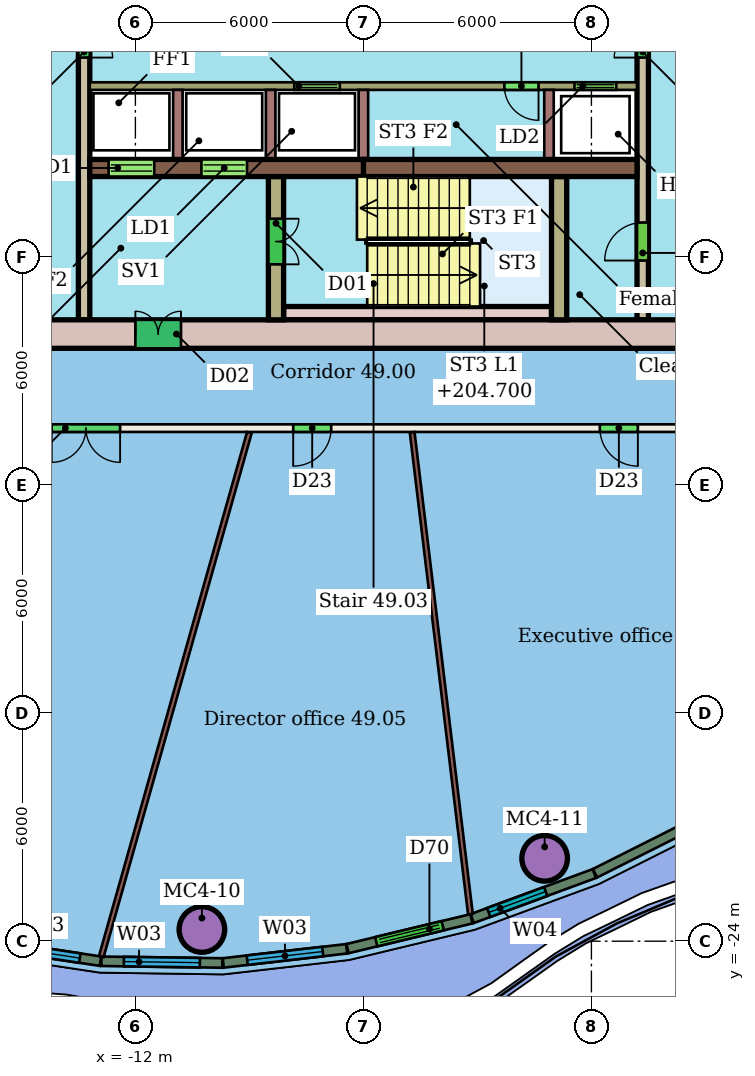
"""IFC4 building model, lengths in metres.
Left out: names, types, materials, properties, quantities, classifications, styles, units other than length and angle.
Written with IfcOpenShell. Run it as: python <this file> out.ifc"""

import sys

from ifc_helpers import new_model, si_unit, direction, frame, frame_2d, origin, origin_2d, place, context, subcontext, project, spatial, rectangle, hollow_circle, extrude, element, fill, save


model = new_model("IFC4")
c1 = context("Model", 3, precision=1e-05, world=origin(), true_north=direction((0.0, 1.0)))
c2 = subcontext(c1, "Body", "Model", "MODEL_VIEW")
j1 = project(units=[si_unit("LENGTHUNIT", "METRE"), si_unit("PLANEANGLEUNIT", "RADIAN")], contexts=[c1])
p1 = place(None, origin())
s1 = spatial("IfcSite", under=j1, at=p1, CompositionType="ELEMENT")
p2 = place(p1, origin())
s2 = spatial("IfcBuilding", under=s1, at=p2, CompositionType="ELEMENT")
p3 = place(p2, frame((0.0, 0.0, 202.9)))
s3 = spatial("IfcBuildingStorey", under=s2, at=p3, CompositionType="ELEMENT", Elevation=202.9)
for number, where, z_axis, x_axis in (
    (1, (-10.25, -23.691, 0.0), (0.0, 0.0, 1.0), (1.0, 0.0, 0.0)),
    (2, (-1.231, -21.819, 0.0), (0.0, 0.0, 1.0), (1.0, 0.0, 0.0)),
):
    element("IfcColumn", number, at=place(p3, frame(where, z_axis=z_axis, x_axis=x_axis)), inside=s3, PredefinedType="COLUMN", context=c2, shape_type="SweptSolid", body=[
        extrude(hollow_circle(Radius=0.6, WallThickness=0.045, at=origin_2d()), origin(), (0.0, 0.0, 1.0), 3.45),
    ])
p4 = place(p3, frame((9.6, -10.5, 0.0), z_axis=(0.0, 0.0, 1.0), x_axis=(-1.0, 0.0, 0.0)))
e3 = element("IfcWall", 3, at=p4, inside=s3, PredefinedType="PARTITIONING", context=c2, shape_type="SweptSolid", body=[
    extrude(rectangle(XDim=31.2, YDim=0.2, at=frame_2d((15.6, 0.0))), origin(), (0.0, 0.0, 1.0), 3.45),
])
p5 = place(p4, frame((22.002, 0.0, 0.0)))
e4 = element("IfcOpeningElement", 4, at=p5, cuts=e3, PredefinedType="OPENING", context=c2, shape_type="SweptSolid", body=[
    extrude(rectangle(XDim=1.8, YDim=2.1, at=frame_2d((0.9, 1.05))), frame((0.0, 0.11, 0.0), z_axis=(0.0, -1.0, 0.0), x_axis=(1.0, 0.0, 0.0)), (0.0, 0.0, 1.0), 0.22),
])
p6 = place(p4, frame((16.448, 0.0, 0.0)))
e5 = element("IfcOpeningElement", 5, at=p6, cuts=e3, PredefinedType="OPENING", context=c2, shape_type="SweptSolid", body=[
    extrude(rectangle(XDim=1.0, YDim=2.4, at=frame_2d((0.5, 1.2))), frame((0.0, 0.11, 0.0), z_axis=(0.0, -1.0, 0.0), x_axis=(1.0, 0.0, 0.0)), (0.0, 0.0, 1.0), 0.22),
])
p7 = place(p4, frame((8.378, 0.0, 0.0)))
e6 = element("IfcOpeningElement", 6, at=p7, cuts=e3, PredefinedType="OPENING", context=c2, shape_type="SweptSolid", body=[
    extrude(rectangle(XDim=1.0, YDim=2.4, at=frame_2d((0.5, 1.2))), frame((0.0, 0.11, 0.0), z_axis=(0.0, -1.0, 0.0), x_axis=(1.0, 0.0, 0.0)), (0.0, 0.0, 1.0), 0.22),
])
p8 = place(p3, frame((-12.897, -24.403, 0.0), z_axis=(0.0, 0.0, 1.0), x_axis=(0.271967297308, 0.962306494416, 0.0)))
e7 = element("IfcWall", 7, at=p8, inside=s3, PredefinedType="PARTITIONING", context=c2, shape_type="SweptSolid", body=[
    extrude(rectangle(XDim=14.326, YDim=0.125, at=frame_2d((7.163, 0.0))), origin(), (0.0, 0.0, 1.0), 3.45),
])
p9 = place(p3, frame((-3.184, -23.289, 0.0), z_axis=(0.0, 0.0, 1.0), x_axis=(-0.12006537802, 0.992765987029, 0.0)))
e8 = element("IfcWall", 8, at=p9, inside=s3, PredefinedType="PARTITIONING", context=c2, shape_type="SweptSolid", body=[
    extrude(rectangle(XDim=12.774, YDim=0.125, at=frame_2d((6.387, 0.0))), origin(), (0.0, 0.0, 1.0), 3.45),
])
p10 = place(p3, frame((-15.981, -24.065, 0.0), z_axis=(0.0, 0.0, 1.0), x_axis=(0.988853480543, -0.148891887014, 0.0)))
e9 = element("IfcWall", 9, at=p10, inside=s3, PredefinedType="SOLIDWALL", context=c2, shape_type="SweptSolid", body=[
    extrude(rectangle(XDim=3.096, YDim=0.25, at=frame_2d((1.548, 0.0))), origin(), (0.0, 0.0, 1.0), 3.1),
])
p11 = place(p10, frame((0.548, 0.0, 0.9)))
e10 = element("IfcOpeningElement", 10, at=p11, cuts=e9, PredefinedType="OPENING", context=c2, shape_type="SweptSolid", body=[
    extrude(rectangle(XDim=2.0, YDim=2.1, at=frame_2d((1.0, 1.05))), frame((0.0, 0.135, 0.0), z_axis=(0.0, -1.0, 0.0), x_axis=(1.0, 0.0, 0.0)), (0.0, 0.0, 1.0), 0.27),
])
p12 = place(p3, frame((-12.895, -24.528, 0.0), z_axis=(0.0, 0.0, 1.0), x_axis=(0.999898209439, -0.014267822551, 0.0)))
e11 = element("IfcWall", 11, at=p12, inside=s3, PredefinedType="SOLIDWALL", context=c2, shape_type="SweptSolid", body=[
    extrude(rectangle(XDim=3.183, YDim=0.25, at=frame_2d((1.591, 0.0))), origin(), (0.0, 0.0, 1.0), 3.1),
])
p13 = place(p12, frame((0.591, 0.0, 0.9)))
e12 = element("IfcOpeningElement", 12, at=p13, cuts=e11, PredefinedType="OPENING", context=c2, shape_type="SweptSolid", body=[
    extrude(rectangle(XDim=2.0, YDim=2.1, at=frame_2d((1.0, 1.05))), frame((0.0, 0.135, 0.0), z_axis=(0.0, -1.0, 0.0), x_axis=(1.0, 0.0, 0.0)), (0.0, 0.0, 1.0), 0.27),
])
p14 = place(p3, frame((-9.688, -24.572, 0.0), z_axis=(0.0, 0.0, 1.0), x_axis=(0.99349628186, 0.113864559585, 0.0)))
e13 = element("IfcWall", 13, at=p14, inside=s3, PredefinedType="SOLIDWALL", context=c2, shape_type="SweptSolid", body=[
    extrude(rectangle(XDim=3.27, YDim=0.25, at=frame_2d((1.635, 0.0))), origin(), (0.0, 0.0, 1.0), 3.1),
])
p15 = place(p14, frame((0.635, 0.0, 0.9)))
e14 = element("IfcOpeningElement", 14, at=p15, cuts=e13, PredefinedType="OPENING", context=c2, shape_type="SweptSolid", body=[
    extrude(rectangle(XDim=2.0, YDim=2.1, at=frame_2d((1.0, 1.05))), frame((0.0, 0.135, 0.0), z_axis=(0.0, -1.0, 0.0), x_axis=(1.0, 0.0, 0.0)), (0.0, 0.0, 1.0), 0.27),
])
p16 = place(p3, frame((-6.417, -24.196, 0.0), z_axis=(0.0, 0.0, 1.0), x_axis=(0.972213814668, 0.234094635926, 0.0)))
e15 = element("IfcWall", 15, at=p16, inside=s3, PredefinedType="SOLIDWALL", context=c2, shape_type="SweptSolid", body=[
    extrude(rectangle(XDim=3.352, YDim=0.25, at=frame_2d((1.676, 0.0))), origin(), (0.0, 0.0, 1.0), 3.1),
])
p17 = place(p16, frame((0.776, 0.0, 0.0)))
e16 = element("IfcOpeningElement", 16, at=p17, cuts=e15, PredefinedType="OPENING", context=c2, shape_type="SweptSolid", body=[
    extrude(rectangle(XDim=1.8, YDim=2.4, at=frame_2d((0.9, 1.2))), frame((0.0, 0.135, 0.0), z_axis=(0.0, -1.0, 0.0), x_axis=(1.0, 0.0, 0.0)), (0.0, 0.0, 1.0), 0.27),
])
p18 = place(p3, frame((-3.137, -23.404, 0.0), z_axis=(0.0, 0.0, 1.0), x_axis=(0.93828100614, 0.345873898288, 0.0)))
e17 = element("IfcWall", 17, at=p18, inside=s3, PredefinedType="SOLIDWALL", context=c2, shape_type="SweptSolid", body=[
    extrude(rectangle(XDim=3.423, YDim=0.25, at=frame_2d((1.712, 0.0))), origin(), (0.0, 0.0, 1.0), 3.1),
])
p19 = place(p18, frame((0.462, 0.0, 0.9)))
e18 = element("IfcOpeningElement", 18, at=p19, cuts=e17, PredefinedType="OPENING", context=c2, shape_type="SweptSolid", body=[
    extrude(rectangle(XDim=1.6, YDim=2.1, at=frame_2d((0.8, 1.05))), frame((0.0, 0.135, 0.0), z_axis=(0.0, -1.0, 0.0), x_axis=(1.0, 0.0, 0.0)), (0.0, 0.0, 1.0), 0.27),
])
p20 = place(p3, frame((0.096, -22.211, 0.0), z_axis=(0.0, 0.0, 1.0), x_axis=(0.893416208643, 0.449229872264, 0.0)))
e19 = element("IfcWall", 19, at=p20, inside=s3, PredefinedType="SOLIDWALL", context=c2, shape_type="SweptSolid", body=[
    extrude(rectangle(XDim=3.437, YDim=0.25, at=frame_2d((1.718, 0.0))), origin(), (0.0, 0.0, 1.0), 3.1),
])
p21 = place(p3, frame((-16.8, -8.025, 0.0), z_axis=(0.0, 0.0, 1.0), x_axis=(1.0, 0.0, 0.0)))
e20 = element("IfcWall", 20, at=p21, inside=s3, PredefinedType="SHEAR", context=c2, shape_type="SweptSolid", body=[
    extrude(rectangle(XDim=21.6, YDim=0.75, at=frame_2d((10.8, 0.0))), origin(), (0.0, 0.0, 1.0), 3.3),
])
p22 = place(p21, frame((4.8, 0.0, 0.0)))
e21 = element("IfcOpeningElement", 21, at=p22, cuts=e20, PredefinedType="OPENING", context=c2, shape_type="SweptSolid", body=[
    extrude(rectangle(XDim=1.2, YDim=2.1, at=frame_2d((0.6, 1.05))), frame((0.0, 0.385, 0.0), z_axis=(0.0, -1.0, 0.0), x_axis=(1.0, 0.0, 0.0)), (0.0, 0.0, 1.0), 0.77),
])
p23 = place(p3, frame((-13.2, -3.655, 0.0), z_axis=(0.0, 0.0, 1.0), x_axis=(1.0, 0.0, 0.0)))
e22 = element("IfcWall", 22, at=p23, inside=s3, PredefinedType="SHEAR", context=c2, shape_type="SweptSolid", body=[
    extrude(rectangle(XDim=7.2, YDim=0.45, at=frame_2d((3.6, 0.0))), origin(), (0.0, 0.0, 1.0), 3.3),
])
p24 = place(p23, frame((0.496, 0.0, 0.0)))
e23 = element("IfcOpeningElement", 23, at=p24, cuts=e22, PredefinedType="OPENING", context=c2, shape_type="SweptSolid", body=[
    extrude(rectangle(XDim=1.2, YDim=2.1, at=frame_2d((0.6, 1.05))), frame((0.0, 0.235, 0.0), z_axis=(0.0, -1.0, 0.0), x_axis=(1.0, 0.0, 0.0)), (0.0, 0.0, 1.0), 0.47),
])
p25 = place(p23, frame((2.938, 0.0, 0.0)))
e24 = element("IfcOpeningElement", 24, at=p25, cuts=e22, PredefinedType="OPENING", context=c2, shape_type="SweptSolid", body=[
    extrude(rectangle(XDim=1.2, YDim=2.1, at=frame_2d((0.6, 1.05))), frame((0.0, 0.235, 0.0), z_axis=(0.0, -1.0, 0.0), x_axis=(1.0, 0.0, 0.0)), (0.0, 0.0, 1.0), 0.47),
])
p26 = place(p3, frame((-6.0, -3.655, 0.0), z_axis=(0.0, 0.0, 1.0), x_axis=(1.0, 0.0, 0.0)))
e25 = element("IfcWall", 25, at=p26, inside=s3, PredefinedType="SHEAR", context=c2, shape_type="SweptSolid", body=[
    extrude(rectangle(XDim=7.2, YDim=0.45, at=frame_2d((3.6, 0.0))), origin(), (0.0, 0.0, 1.0), 3.3),
])
p27 = place(p3, frame((-13.35, 7.65, 0.0), z_axis=(0.0, 0.0, 1.0), x_axis=(0.0, -1.0, 0.0)))
e26 = element("IfcWall", 26, at=p27, inside=s3, PredefinedType="SHEAR", context=c2, shape_type="SweptSolid", body=[
    extrude(rectangle(XDim=15.3, YDim=0.3, at=frame_2d((7.65, 0.0))), origin(), (0.0, 0.0, 1.0), 3.3),
])
p28 = place(p27, frame((6.9, 0.0, 0.0)))
e27 = element("IfcOpeningElement", 27, at=p28, cuts=e26, PredefinedType="OPENING", context=c2, shape_type="SweptSolid", body=[
    extrude(rectangle(XDim=1.5, YDim=2.1, at=frame_2d((0.75, 1.05))), frame((0.0, 0.16, 0.0), z_axis=(0.0, -1.0, 0.0), x_axis=(1.0, 0.0, 0.0)), (0.0, 0.0, 1.0), 0.32),
])
p29 = place(p3, frame((1.35, -7.65, 0.0), z_axis=(0.0, 0.0, 1.0), x_axis=(0.0, 1.0, 0.0)))
e28 = element("IfcWall", 28, at=p29, inside=s3, PredefinedType="SHEAR", context=c2, shape_type="SweptSolid", body=[
    extrude(rectangle(XDim=15.3, YDim=0.3, at=frame_2d((7.65, 0.0))), origin(), (0.0, 0.0, 1.0), 3.3),
])
p30 = place(p29, frame((1.56, 0.0, 0.0)))
e29 = element("IfcOpeningElement", 29, at=p30, cuts=e28, PredefinedType="OPENING", context=c2, shape_type="SweptSolid", body=[
    extrude(rectangle(XDim=1.0, YDim=2.1, at=frame_2d((0.5, 1.05))), frame((0.0, 0.16, 0.0), z_axis=(0.0, -1.0, 0.0), x_axis=(1.0, 0.0, 0.0)), (0.0, 0.0, 1.0), 0.32),
])
p31 = place(p29, frame((6.9, 0.0, 0.0)))
e30 = element("IfcOpeningElement", 30, at=p31, cuts=e28, PredefinedType="OPENING", context=c2, shape_type="SweptSolid", body=[
    extrude(rectangle(XDim=1.5, YDim=2.1, at=frame_2d((0.75, 1.05))), frame((0.0, 0.16, 0.0), z_axis=(0.0, -1.0, 0.0), x_axis=(1.0, 0.0, 0.0)), (0.0, 0.0, 1.0), 0.32),
])
p32 = place(p3, frame((1.2, -1.5, 0.0), z_axis=(0.0, 0.0, 1.0), x_axis=(-1.0, 0.0, 0.0)))
e31 = element("IfcWall", 31, at=p32, inside=s3, PredefinedType="SHEAR", context=c2, shape_type="SweptSolid", body=[
    extrude(rectangle(XDim=14.4, YDim=0.2, at=frame_2d((7.2, 0.0))), origin(), (0.0, 0.0, 1.0), 3.3),
])
p33 = place(p32, frame((7.821, 0.0, 0.0)))
e32 = element("IfcOpeningElement", 32, at=p33, cuts=e31, PredefinedType="OPENING", context=c2, shape_type="SweptSolid", body=[
    extrude(rectangle(XDim=1.2, YDim=2.1, at=frame_2d((0.6, 1.05))), frame((0.0, 0.11, 0.0), z_axis=(0.0, -1.0, 0.0), x_axis=(1.0, 0.0, 0.0)), (0.0, 0.0, 1.0), 0.22),
])
p34 = place(p32, frame((0.546, 0.0, 0.0)))
e33 = element("IfcOpeningElement", 33, at=p34, cuts=e31, PredefinedType="OPENING", context=c2, shape_type="SweptSolid", body=[
    extrude(rectangle(XDim=1.1, YDim=2.1, at=frame_2d((0.55, 1.05))), frame((0.0, 0.11, 0.0), z_axis=(0.0, -1.0, 0.0), x_axis=(1.0, 0.0, 0.0)), (0.0, 0.0, 1.0), 0.22),
])
p35 = place(p32, frame((2.592, 0.0, 0.0)))
e34 = element("IfcOpeningElement", 34, at=p35, cuts=e31, PredefinedType="OPENING", context=c2, shape_type="SweptSolid", body=[
    extrude(rectangle(XDim=0.9, YDim=2.1, at=frame_2d((0.45, 1.05))), frame((0.0, 0.11, 0.0), z_axis=(0.0, -1.0, 0.0), x_axis=(1.0, 0.0, 0.0)), (0.0, 0.0, 1.0), 0.22),
])
p36 = place(p3, frame((-8.3, -3.88, 0.0), z_axis=(0.0, 0.0, 1.0), x_axis=(0.0, -1.0, 0.0)))
e35 = element("IfcWall", 35, at=p36, inside=s3, PredefinedType="SHEAR", context=c2, shape_type="SweptSolid", body=[
    extrude(rectangle(XDim=3.77, YDim=0.4, at=frame_2d((1.885, 0.0))), origin(), (0.0, 0.0, 1.0), 3.3),
])
p37 = place(p36, frame((1.11, 0.0, 0.0)))
e36 = element("IfcOpeningElement", 36, at=p37, cuts=e35, PredefinedType="OPENING", context=c2, shape_type="SweptSolid", body=[
    extrude(rectangle(XDim=1.2, YDim=2.1, at=frame_2d((0.6, 1.05))), frame((0.0, 0.21, 0.0), z_axis=(0.0, -1.0, 0.0), x_axis=(1.0, 0.0, 0.0)), (0.0, 0.0, 1.0), 0.42),
])
p38 = place(p3, frame((-0.85, -3.88, 0.0), z_axis=(0.0, 0.0, 1.0), x_axis=(0.0, -1.0, 0.0)))
e37 = element("IfcWall", 37, at=p38, inside=s3, PredefinedType="SHEAR", context=c2, shape_type="SweptSolid", body=[
    extrude(rectangle(XDim=3.77, YDim=0.4, at=frame_2d((1.885, 0.0))), origin(), (0.0, 0.0, 1.0), 3.3),
])
p39 = place(p3, frame((-8.1, -7.475, 0.0), z_axis=(0.0, 0.0, 1.0), x_axis=(1.0, 0.0, 0.0)))
e38 = element("IfcWall", 38, at=p39, inside=s3, PredefinedType="SHEAR", context=c2, shape_type="SweptSolid", body=[
    extrude(rectangle(XDim=7.05, YDim=0.35, at=frame_2d((3.525, 0.0))), origin(), (0.0, 0.0, 1.0), 3.3),
])
for number, where, z_axis, x_axis in (
    (39, (-10.883, -1.6, 0.0), (0.0, 0.0, 1.0), (0.0, -1.0, 0.0)),
    (40, (-8.442, -1.6, 0.0), (0.0, 0.0, 1.0), (0.0, -1.0, 0.0)),
    (41, (-6.0, -1.6, 0.0), (0.0, 0.0, 1.0), (0.0, -1.0, 0.0)),
    (42, (-1.117, -1.6, 0.0), (0.0, 0.0, 1.0), (0.0, -1.0, 0.0)),
):
    element("IfcWall", number, at=place(p3, frame(where, z_axis=z_axis, x_axis=x_axis)), inside=s3, PredefinedType="SHEAR", context=c2, shape_type="SweptSolid", body=[
        extrude(rectangle(XDim=1.83, YDim=0.25, at=frame_2d((0.915, 0.0))), origin(), (0.0, 0.0, 1.0), 3.3),
    ])
p40 = place(p5, origin())
e43 = element("IfcDoor", 43, at=p40, inside=s3, OperationType="DOUBLE_DOOR_SINGLE_SWING", PredefinedType="DOOR", context=c2, shape_type="SweptSolid", body=[
    extrude(rectangle(XDim=1.8, YDim=2.1, at=frame_2d((0.9, 1.05))), frame((0.0, 0.025, 0.0), z_axis=(0.0, -1.0, 0.0), x_axis=(1.0, 0.0, 0.0)), (0.0, 0.0, 1.0), 0.05),
])
fill(e4, e43)
p41 = place(p6, origin())
e44 = element("IfcDoor", 44, at=p41, inside=s3, OperationType="SINGLE_SWING_RIGHT", PredefinedType="DOOR", context=c2, shape_type="SweptSolid", body=[
    extrude(rectangle(XDim=1.0, YDim=2.4, at=frame_2d((0.5, 1.2))), frame((0.0, 0.025, 0.0), z_axis=(0.0, -1.0, 0.0), x_axis=(1.0, 0.0, 0.0)), (0.0, 0.0, 1.0), 0.05),
])
fill(e5, e44)
p42 = place(p7, origin())
e45 = element("IfcDoor", 45, at=p42, inside=s3, OperationType="SINGLE_SWING_LEFT", PredefinedType="DOOR", context=c2, shape_type="SweptSolid", body=[
    extrude(rectangle(XDim=1.0, YDim=2.4, at=frame_2d((0.5, 1.2))), frame((0.0, 0.025, 0.0), z_axis=(0.0, -1.0, 0.0), x_axis=(1.0, 0.0, 0.0)), (0.0, 0.0, 1.0), 0.05),
])
fill(e6, e45)
p43 = place(p11, origin())
e46 = element("IfcWindow", 46, at=p43, inside=s3, PartitioningType="SINGLE_PANEL", PredefinedType="WINDOW", context=c2, shape_type="SweptSolid", body=[
    extrude(rectangle(XDim=2.0, YDim=2.1, at=frame_2d((1.0, 1.05))), frame((0.0, 0.03, 0.0), z_axis=(0.0, -1.0, 0.0), x_axis=(1.0, 0.0, 0.0)), (0.0, 0.0, 1.0), 0.06),
])
fill(e10, e46)
p44 = place(p13, origin())
e47 = element("IfcWindow", 47, at=p44, inside=s3, PartitioningType="SINGLE_PANEL", PredefinedType="WINDOW", context=c2, shape_type="SweptSolid", body=[
    extrude(rectangle(XDim=2.0, YDim=2.1, at=frame_2d((1.0, 1.05))), frame((0.0, 0.03, 0.0), z_axis=(0.0, -1.0, 0.0), x_axis=(1.0, 0.0, 0.0)), (0.0, 0.0, 1.0), 0.06),
])
fill(e12, e47)
p45 = place(p15, origin())
e48 = element("IfcWindow", 48, at=p45, inside=s3, PartitioningType="SINGLE_PANEL", PredefinedType="WINDOW", context=c2, shape_type="SweptSolid", body=[
    extrude(rectangle(XDim=2.0, YDim=2.1, at=frame_2d((1.0, 1.05))), frame((0.0, 0.03, 0.0), z_axis=(0.0, -1.0, 0.0), x_axis=(1.0, 0.0, 0.0)), (0.0, 0.0, 1.0), 0.06),
])
fill(e14, e48)
p46 = place(p17, origin())
e49 = element("IfcDoor", 49, at=p46, inside=s3, OperationType="DOUBLE_DOOR_SLIDING", PredefinedType="DOOR", context=c2, shape_type="SweptSolid", body=[
    extrude(rectangle(XDim=1.8, YDim=2.4, at=frame_2d((0.9, 1.2))), frame((0.0, 0.025, 0.0), z_axis=(0.0, -1.0, 0.0), x_axis=(1.0, 0.0, 0.0)), (0.0, 0.0, 1.0), 0.05),
])
fill(e16, e49)
p47 = place(p19, origin())
e50 = element("IfcWindow", 50, at=p47, inside=s3, PartitioningType="SINGLE_PANEL", PredefinedType="WINDOW", context=c2, shape_type="SweptSolid", body=[
    extrude(rectangle(XDim=1.6, YDim=2.1, at=frame_2d((0.8, 1.05))), frame((0.0, 0.03, 0.0), z_axis=(0.0, -1.0, 0.0), x_axis=(1.0, 0.0, 0.0)), (0.0, 0.0, 1.0), 0.06),
])
fill(e18, e50)
p48 = place(p22, origin())
e51 = element("IfcDoor", 51, at=p48, inside=s3, OperationType="DOUBLE_DOOR_SINGLE_SWING", PredefinedType="NOTDEFINED", context=c2, shape_type="SweptSolid", body=[
    extrude(rectangle(XDim=1.2, YDim=2.1, at=frame_2d((0.6, 1.05))), frame((0.0, 0.025, 0.0), z_axis=(0.0, -1.0, 0.0), x_axis=(1.0, 0.0, 0.0)), (0.0, 0.0, 1.0), 0.05),
])
fill(e21, e51)
p49 = place(p24, origin())
e52 = element("IfcDoor", 52, at=p49, inside=s3, OperationType="DOUBLE_DOOR_SLIDING", PredefinedType="NOTDEFINED", context=c2, shape_type="SweptSolid", body=[
    extrude(rectangle(XDim=1.2, YDim=2.1, at=frame_2d((0.6, 1.05))), frame((0.0, 0.025, 0.0), z_axis=(0.0, -1.0, 0.0), x_axis=(1.0, 0.0, 0.0)), (0.0, 0.0, 1.0), 0.05),
])
fill(e23, e52)
p50 = place(p25, origin())
e53 = element("IfcDoor", 53, at=p50, inside=s3, OperationType="DOUBLE_DOOR_SLIDING", PredefinedType="NOTDEFINED", context=c2, shape_type="SweptSolid", body=[
    extrude(rectangle(XDim=1.2, YDim=2.1, at=frame_2d((0.6, 1.05))), frame((0.0, 0.025, 0.0), z_axis=(0.0, -1.0, 0.0), x_axis=(1.0, 0.0, 0.0)), (0.0, 0.0, 1.0), 0.05),
])
fill(e24, e53)
p51 = place(p28, origin())
e54 = element("IfcDoor", 54, at=p51, inside=s3, OperationType="DOUBLE_DOOR_SINGLE_SWING", PredefinedType="NOTDEFINED", context=c2, shape_type="SweptSolid", body=[
    extrude(rectangle(XDim=1.5, YDim=2.1, at=frame_2d((0.75, 1.05))), frame((0.0, 0.025, 0.0), z_axis=(0.0, -1.0, 0.0), x_axis=(1.0, 0.0, 0.0)), (0.0, 0.0, 1.0), 0.05),
])
fill(e27, e54)
p52 = place(p30, origin())
e55 = element("IfcDoor", 55, at=p52, inside=s3, OperationType="SINGLE_SWING_LEFT", PredefinedType="NOTDEFINED", context=c2, shape_type="SweptSolid", body=[
    extrude(rectangle(XDim=1.0, YDim=2.1, at=frame_2d((0.5, 1.05))), frame((0.0, 0.025, 0.0), z_axis=(0.0, -1.0, 0.0), x_axis=(1.0, 0.0, 0.0)), (0.0, 0.0, 1.0), 0.05),
])
fill(e29, e55)
p53 = place(p31, origin())
e56 = element("IfcDoor", 56, at=p53, inside=s3, OperationType="DOUBLE_DOOR_SINGLE_SWING", PredefinedType="NOTDEFINED", context=c2, shape_type="SweptSolid", body=[
    extrude(rectangle(XDim=1.5, YDim=2.1, at=frame_2d((0.75, 1.05))), frame((0.0, 0.025, 0.0), z_axis=(0.0, -1.0, 0.0), x_axis=(1.0, 0.0, 0.0)), (0.0, 0.0, 1.0), 0.05),
])
fill(e30, e56)
p54 = place(p33, origin())
e57 = element("IfcDoor", 57, at=p54, inside=s3, OperationType="DOUBLE_DOOR_SLIDING", PredefinedType="NOTDEFINED", context=c2, shape_type="SweptSolid", body=[
    extrude(rectangle(XDim=1.2, YDim=2.1, at=frame_2d((0.6, 1.05))), frame((0.0, 0.025, 0.0), z_axis=(0.0, -1.0, 0.0), x_axis=(1.0, 0.0, 0.0)), (0.0, 0.0, 1.0), 0.05),
])
fill(e32, e57)
p55 = place(p34, origin())
e58 = element("IfcDoor", 58, at=p55, inside=s3, OperationType="DOUBLE_DOOR_SLIDING", PredefinedType="NOTDEFINED", context=c2, shape_type="SweptSolid", body=[
    extrude(rectangle(XDim=1.1, YDim=2.1, at=frame_2d((0.55, 1.05))), frame((0.0, 0.025, 0.0), z_axis=(0.0, -1.0, 0.0), x_axis=(1.0, 0.0, 0.0)), (0.0, 0.0, 1.0), 0.05),
])
fill(e33, e58)
p56 = place(p35, origin())
e59 = element("IfcDoor", 59, at=p56, inside=s3, OperationType="SINGLE_SWING_LEFT", PredefinedType="NOTDEFINED", context=c2, shape_type="SweptSolid", body=[
    extrude(rectangle(XDim=0.9, YDim=2.1, at=frame_2d((0.45, 1.05))), frame((0.0, 0.025, 0.0), z_axis=(0.0, -1.0, 0.0), x_axis=(1.0, 0.0, 0.0)), (0.0, 0.0, 1.0), 0.05),
])
fill(e34, e59)
p57 = place(p37, origin())
e60 = element("IfcDoor", 60, at=p57, inside=s3, OperationType="DOUBLE_DOOR_SINGLE_SWING", PredefinedType="NOTDEFINED", context=c2, shape_type="SweptSolid", body=[
    extrude(rectangle(XDim=1.2, YDim=2.1, at=frame_2d((0.6, 1.05))), frame((0.0, 0.025, 0.0), z_axis=(0.0, -1.0, 0.0), x_axis=(1.0, 0.0, 0.0)), (0.0, 0.0, 1.0), 0.05),
])
fill(e36, e60)
save(model, sys.argv[1])
